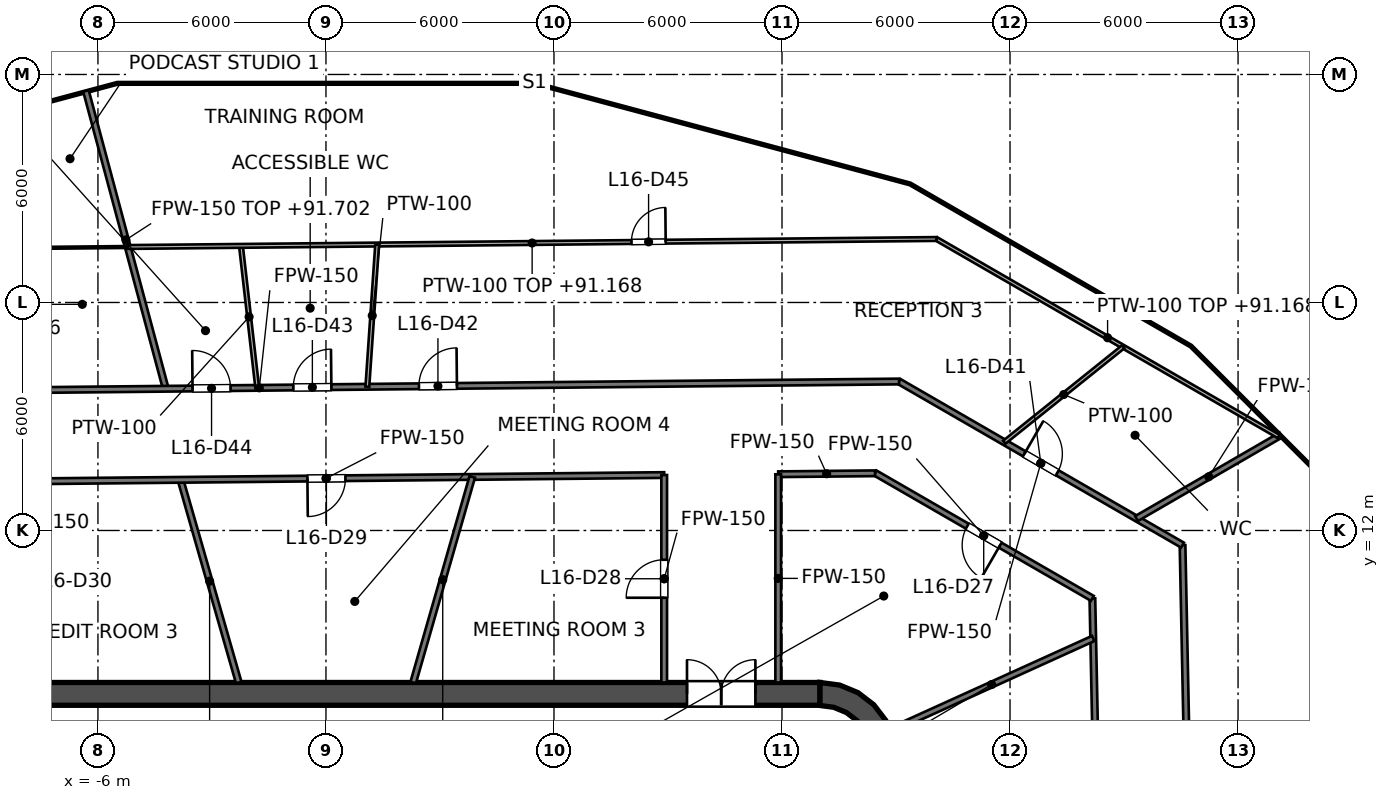
"""IFC4 building model, lengths in metres.
Left out: names, types, materials, properties, quantities, classifications, styles, units other than length and angle.
Written with IfcOpenShell. Run it as: python <this file> out.ifc"""

import sys

from ifc_helpers import new_model, si_unit, direction, frame, frame_2d, origin, place, context, subcontext, project, spatial, polyline, rectangle, outline, extrude, element, fill, save


model = new_model("IFC4")
c1 = context("Model", 3, precision=1e-05, world=origin(), true_north=direction((0.0, 1.0)))
c2 = subcontext(c1, "Body", "Model", "MODEL_VIEW")
j1 = project(units=[si_unit("LENGTHUNIT", "METRE"), si_unit("PLANEANGLEUNIT", "RADIAN")], contexts=[c1])
p1 = place(None, origin())
s1 = spatial("IfcSite", under=j1, at=p1, CompositionType="ELEMENT")
p2 = place(p1, origin())
s2 = spatial("IfcBuilding", under=s1, at=p2, CompositionType="ELEMENT")
p3 = place(p2, frame((0.0, 0.0, 88.2)))
s3 = spatial("IfcBuildingStorey", under=s2, at=p3, CompositionType="ELEMENT", Elevation=88.2)
p4 = place(p3, frame((-13.0, 7.7, 0.0), z_axis=(0.0, 0.0, 1.0), x_axis=(1.0, 0.0, 0.0)))
e1 = element("IfcWall", 1, at=p4, inside=s3, PredefinedType="SHEAR", context=c2, shape_type="SweptSolid", body=[
    extrude(rectangle(XDim=26.0, YDim=0.6, at=frame_2d((13.0, 0.0))), origin(), (0.0, 0.0, 1.0), 4.2),
])
p5 = place(p4, frame((1.7, 0.0, 0.0)))
e2 = element("IfcOpeningElement", 2, at=p5, cuts=e1, PredefinedType="OPENING", context=c2, shape_type="SweptSolid", body=[
    extrude(rectangle(XDim=1.8, YDim=2.1, at=frame_2d((0.9, 1.05))), frame((0.0, 0.3, 0.0), z_axis=(0.0, -1.0, 0.0), x_axis=(1.0, 0.0, 0.0)), (0.0, 0.0, 1.0), 0.6),
])
p6 = place(p4, frame((22.5, 0.0, 0.0)))
e3 = element("IfcOpeningElement", 3, at=p6, cuts=e1, PredefinedType="OPENING", context=c2, shape_type="SweptSolid", body=[
    extrude(rectangle(XDim=1.8, YDim=2.1, at=frame_2d((0.9, 1.05))), frame((0.0, 0.3, 0.0), z_axis=(0.0, -1.0, 0.0), x_axis=(1.0, 0.0, 0.0)), (0.0, 0.0, 1.0), 0.6),
])
p7 = place(p3, origin())
e4 = element("IfcWall", 4, at=p7, inside=s3, PredefinedType="SHEAR", context=c2, shape_type="SweptSolid", body=[
    extrude(outline(polyline([(13.0, 8.0), (13.0, 7.395), (13.361, 7.347), (13.698, 7.208), (13.986, 6.986), (14.208, 6.698), (14.347, 6.361), (14.395, 6.0), (15.0, 6.0), (14.932, 6.518), (14.732, 7.0), (14.414, 7.414), (14.0, 7.732), (13.518, 7.932), (13.0, 8.0)])), origin(), (0.0, 0.0, 1.0), 4.2),
])
p8 = place(p3, frame((-9.125, 7.0, 0.0), z_axis=(0.0, 0.0, 1.0), x_axis=(1.0, 0.0, 0.0)))
e5 = element("IfcWall", 5, at=p8, inside=s3, PredefinedType="SOLIDWALL", context=c2, shape_type="SweptSolid", body=[
    extrude(rectangle(XDim=18.25, YDim=0.8, at=frame_2d((9.125, 0.0))), origin(), (0.0, 0.0, 1.0), 4.05),
])
p9 = place(p3, frame((11.8, -7.4, 0.0), z_axis=(0.0, 0.0, 1.0), x_axis=(0.0, 1.0, 0.0)))
e6 = element("IfcWall", 6, at=p9, inside=s3, PredefinedType="SOLIDWALL", context=c2, shape_type="SweptSolid", body=[
    extrude(rectangle(XDim=14.8, YDim=0.4, at=frame_2d((7.4, 0.0))), origin(), (0.0, 0.0, 1.0), 4.05),
])
p10 = place(p9, frame((11.2, 0.0, 0.0)))
e7 = element("IfcOpeningElement", 7, at=p10, cuts=e6, PredefinedType="OPENING", context=c2, shape_type="SweptSolid", body=[
    extrude(rectangle(XDim=1.1, YDim=2.1, at=frame_2d((0.55, 1.05))), frame((0.0, 0.2, 0.0), z_axis=(0.0, -1.0, 0.0), x_axis=(1.0, 0.0, 0.0)), (0.0, 0.0, 1.0), 0.4),
])
p11 = place(p9, frame((8.3, 0.0, 0.0)))
e8 = element("IfcOpeningElement", 8, at=p11, cuts=e6, PredefinedType="OPENING", context=c2, shape_type="SweptSolid", body=[
    extrude(rectangle(XDim=1.1, YDim=2.1, at=frame_2d((0.55, 1.05))), frame((0.0, 0.2, 0.0), z_axis=(0.0, -1.0, 0.0), x_axis=(1.0, 0.0, 0.0)), (0.0, 0.0, 1.0), 0.4),
])
p12 = place(p9, frame((5.4, 0.0, 0.0)))
e9 = element("IfcOpeningElement", 9, at=p12, cuts=e6, PredefinedType="OPENING", context=c2, shape_type="SweptSolid", body=[
    extrude(rectangle(XDim=1.1, YDim=2.1, at=frame_2d((0.55, 1.05))), frame((0.0, 0.2, 0.0), z_axis=(0.0, -1.0, 0.0), x_axis=(1.0, 0.0, 0.0)), (0.0, 0.0, 1.0), 0.4),
])
p13 = place(p9, frame((13.552, 0.0, 0.0)))
e10 = element("IfcOpeningElement", 10, at=p13, cuts=e6, PredefinedType="OPENING", context=c2, shape_type="SweptSolid", body=[
    extrude(rectangle(XDim=0.9, YDim=2.1, at=frame_2d((0.45, 1.05))), frame((0.0, 0.2, 0.0), z_axis=(0.0, -1.0, 0.0), x_axis=(1.0, 0.0, 0.0)), (0.0, 0.0, 1.0), 0.4),
])
p14 = place(p9, frame((0.347, 0.0, 0.0)))
e11 = element("IfcOpeningElement", 11, at=p14, cuts=e6, PredefinedType="OPENING", context=c2, shape_type="SweptSolid", body=[
    extrude(rectangle(XDim=0.9, YDim=2.1, at=frame_2d((0.45, 1.05))), frame((0.0, 0.2, 0.0), z_axis=(0.0, -1.0, 0.0), x_axis=(1.0, 0.0, 0.0)), (0.0, 0.0, 1.0), 0.4),
])
p15 = place(p3, frame((20.167, 10.213, 0.0), z_axis=(0.0, 0.0, 1.0), x_axis=(0.020610894613, -0.999787572949, 0.0)))
e12 = element("IfcWall", 12, at=p15, inside=s3, PredefinedType="PARTITIONING", context=c2, shape_type="SweptSolid", body=[
    extrude(rectangle(XDim=17.637, YDim=0.15, at=frame_2d((8.819, 0.0))), origin(), (0.0, 0.0, 1.0), 2.968),
])
p16 = place(p15, frame((10.508, 0.0, 0.0)))
e13 = element("IfcOpeningElement", 13, at=p16, cuts=e12, PredefinedType="OPENING", context=c2, shape_type="SweptSolid", body=[
    extrude(rectangle(XDim=1.0, YDim=2.1, at=frame_2d((0.5, 1.05))), frame((0.0, 0.075, 0.0), z_axis=(0.0, -1.0, 0.0), x_axis=(1.0, 0.0, 0.0)), (0.0, 0.0, 1.0), 0.15),
])
p17 = place(p15, frame((5.09, 0.0, 0.0)))
e14 = element("IfcOpeningElement", 14, at=p17, cuts=e12, PredefinedType="OPENING", context=c2, shape_type="SweptSolid", body=[
    extrude(rectangle(XDim=1.0, YDim=2.1, at=frame_2d((0.5, 1.05))), frame((0.0, 0.075, 0.0), z_axis=(0.0, -1.0, 0.0), x_axis=(1.0, 0.0, 0.0)), (0.0, 0.0, 1.0), 0.15),
])
p18 = place(p3, frame((22.539, 11.615, 0.0), z_axis=(0.0, 0.0, 1.0), x_axis=(0.020601506683, -0.99978776644, 0.0)))
e15 = element("IfcWall", 15, at=p18, inside=s3, PredefinedType="PARTITIONING", context=c2, shape_type="SweptSolid", body=[
    extrude(rectangle(XDim=19.66, YDim=0.15, at=frame_2d((9.83, 0.0))), origin(), (0.0, 0.0, 1.0), 2.968),
])
p19 = place(p18, frame((13.54, 0.0, 0.0)))
e16 = element("IfcOpeningElement", 16, at=p19, cuts=e15, PredefinedType="OPENING", context=c2, shape_type="SweptSolid", body=[
    extrude(rectangle(XDim=1.0, YDim=2.1, at=frame_2d((0.5, 1.05))), frame((0.0, 0.075, 0.0), z_axis=(0.0, -1.0, 0.0), x_axis=(1.0, 0.0, 0.0)), (0.0, 0.0, 1.0), 0.15),
])
p20 = place(p18, frame((9.23, 0.0, 0.0)))
e17 = element("IfcOpeningElement", 17, at=p20, cuts=e15, PredefinedType="OPENING", context=c2, shape_type="SweptSolid", body=[
    extrude(rectangle(XDim=1.0, YDim=2.1, at=frame_2d((0.5, 1.05))), frame((0.0, 0.075, 0.0), z_axis=(0.0, -1.0, 0.0), x_axis=(1.0, 0.0, 0.0)), (0.0, 0.0, 1.0), 0.15),
])
p21 = place(p3, frame((-6.315, 23.566, 0.0), z_axis=(0.0, 0.0, 1.0), x_axis=(0.258844392232, -0.96591903419, 0.0)))
e18 = element("IfcWall", 18, at=p21, inside=s3, PredefinedType="PARTITIONING", context=c2, shape_type="SweptSolid", body=[
    extrude(rectangle(XDim=8.112, YDim=0.15, at=frame_2d((4.056, 0.0))), origin(), (0.0, 0.0, 1.0), 3.502),
])
p22 = place(p3, frame((-3.827, 13.333, 0.0), z_axis=(0.0, 0.0, 1.0), x_axis=(0.275935525478, -0.961176147113, 0.0)))
e19 = element("IfcWall", 19, at=p22, inside=s3, PredefinedType="PARTITIONING", context=c2, shape_type="SweptSolid", body=[
    extrude(rectangle(XDim=5.548, YDim=0.15, at=frame_2d((2.774, 0.0))), origin(), (0.0, 0.0, 1.0), 3.9),
])
p23 = place(p3, frame((14.448, 13.515, 0.0), z_axis=(0.0, 0.0, 1.0), x_axis=(0.866032288321, -0.499988075443, 0.0)))
e20 = element("IfcWall", 20, at=p23, inside=s3, PredefinedType="PARTITIONING", context=c2, shape_type="SweptSolid", body=[
    extrude(rectangle(XDim=6.604, YDim=0.15, at=frame_2d((3.302, 0.0))), origin(), (0.0, 0.0, 1.0), 2.968),
])
p24 = place(p23, frame((2.802, 0.0, 0.0)))
e21 = element("IfcOpeningElement", 21, at=p24, cuts=e20, PredefinedType="OPENING", context=c2, shape_type="SweptSolid", body=[
    extrude(rectangle(XDim=1.0, YDim=2.1, at=frame_2d((0.5, 1.05))), frame((0.0, 0.075, 0.0), z_axis=(0.0, -1.0, 0.0), x_axis=(1.0, 0.0, 0.0)), (0.0, 0.0, 1.0), 0.15),
])
p25 = place(p3, frame((15.08, 15.921, 0.0), z_axis=(0.0, 0.0, 1.0), x_axis=(0.866020838546, -0.500007907142, 0.0)))
e22 = element("IfcWall", 22, at=p25, inside=s3, PredefinedType="PARTITIONING", context=c2, shape_type="SweptSolid", body=[
    extrude(rectangle(XDim=8.613, YDim=0.15, at=frame_2d((4.306, 0.0))), origin(), (0.0, 0.0, 1.0), 2.968),
])
p26 = place(p25, frame((3.807, 0.0, 0.0)))
e23 = element("IfcOpeningElement", 23, at=p26, cuts=e22, PredefinedType="OPENING", context=c2, shape_type="SweptSolid", body=[
    extrude(rectangle(XDim=1.0, YDim=2.1, at=frame_2d((0.5, 1.05))), frame((0.0, 0.075, 0.0), z_axis=(0.0, -1.0, 0.0), x_axis=(1.0, 0.0, 0.0)), (0.0, 0.0, 1.0), 0.15),
])
p27 = place(p3, frame((-8.9, 13.282, 0.0), z_axis=(0.0, 0.0, 1.0), x_axis=(0.999950834077, 0.009916119672, 0.0)))
e24 = element("IfcWall", 24, at=p27, inside=s3, PredefinedType="PARTITIONING", context=c2, shape_type="SweptSolid", body=[
    extrude(rectangle(XDim=17.801, YDim=0.15, at=frame_2d((8.9, 0.0))), origin(), (0.0, 0.0, 1.0), 2.968),
])
p28 = place(p27, frame((8.412, 0.0, 0.0)))
e25 = element("IfcOpeningElement", 25, at=p28, cuts=e24, PredefinedType="OPENING", context=c2, shape_type="SweptSolid", body=[
    extrude(rectangle(XDim=1.0, YDim=2.1, at=frame_2d((0.5, 1.05))), frame((0.0, 0.075, 0.0), z_axis=(0.0, -1.0, 0.0), x_axis=(1.0, 0.0, 0.0)), (0.0, 0.0, 1.0), 0.15),
])
p29 = place(p3, frame((11.9, 13.48, 0.0), z_axis=(0.0, 0.0, 1.0), x_axis=(0.999950357576, 0.009964054536, 0.0)))
e26 = element("IfcWall", 26, at=p29, inside=s3, PredefinedType="PARTITIONING", context=c2, shape_type="SweptSolid", body=[
    extrude(rectangle(XDim=2.548, YDim=0.15, at=frame_2d((1.274, 0.0))), origin(), (0.0, 0.0, 1.0), 2.968),
])
p30 = place(p3, frame((-18.587, 15.587, 0.0), z_axis=(0.0, 0.0, 1.0), x_axis=(0.99995087003, 0.009912493396, 0.0)))
e27 = element("IfcWall", 27, at=p30, inside=s3, PredefinedType="PARTITIONING", context=c2, shape_type="SweptSolid", body=[
    extrude(rectangle(XDim=33.669, YDim=0.15, at=frame_2d((16.834, 0.0))), origin(), (0.0, 0.0, 1.0), 2.968),
])
p31 = place(p30, frame((21.034, 0.0, 0.0)))
e28 = element("IfcOpeningElement", 28, at=p31, cuts=e27, PredefinedType="OPENING", context=c2, shape_type="SweptSolid", body=[
    extrude(rectangle(XDim=1.0, YDim=2.1, at=frame_2d((0.5, 1.05))), frame((0.0, 0.075, 0.0), z_axis=(0.0, -1.0, 0.0), x_axis=(1.0, 0.0, 0.0)), (0.0, 0.0, 1.0), 0.15),
])
p32 = place(p30, frame((17.73, 0.0, 0.0)))
e29 = element("IfcOpeningElement", 29, at=p32, cuts=e27, PredefinedType="OPENING", context=c2, shape_type="SweptSolid", body=[
    extrude(rectangle(XDim=1.0, YDim=2.1, at=frame_2d((0.5, 1.05))), frame((0.0, 0.075, 0.0), z_axis=(0.0, -1.0, 0.0), x_axis=(1.0, 0.0, 0.0)), (0.0, 0.0, 1.0), 0.15),
])
p33 = place(p30, frame((15.077, 0.0, 0.0)))
e30 = element("IfcOpeningElement", 30, at=p33, cuts=e27, PredefinedType="OPENING", context=c2, shape_type="SweptSolid", body=[
    extrude(rectangle(XDim=1.0, YDim=2.1, at=frame_2d((0.5, 1.05))), frame((0.0, 0.075, 0.0), z_axis=(0.0, -1.0, 0.0), x_axis=(1.0, 0.0, 0.0)), (0.0, 0.0, 1.0), 0.15),
])
p34 = place(p30, frame((10.026, 0.0, 0.0)))
e31 = element("IfcOpeningElement", 31, at=p34, cuts=e27, PredefinedType="OPENING", context=c2, shape_type="SweptSolid", body=[
    extrude(rectangle(XDim=1.0, YDim=2.1, at=frame_2d((0.5, 1.05))), frame((0.0, 0.075, 0.0), z_axis=(0.0, -1.0, 0.0), x_axis=(1.0, 0.0, 0.0)), (0.0, 0.0, 1.0), 0.15),
])
p35 = place(p30, frame((2.737, 0.0, 0.0)))
e32 = element("IfcOpeningElement", 32, at=p35, cuts=e27, PredefinedType="OPENING", context=c2, shape_type="SweptSolid", body=[
    extrude(rectangle(XDim=1.0, YDim=2.1, at=frame_2d((0.5, 1.05))), frame((0.0, 0.075, 0.0), z_axis=(0.0, -1.0, 0.0), x_axis=(1.0, 0.0, 0.0)), (0.0, 0.0, 1.0), 0.15),
])
p36 = place(p3, frame((14.843, 6.733, 0.0), z_axis=(0.0, 0.0, 1.0), x_axis=(0.910628361306, 0.413226315214, 0.0)))
e33 = element("IfcWall", 33, at=p36, inside=s3, PredefinedType="PARTITIONING", context=c2, shape_type="SweptSolid", body=[
    extrude(rectangle(XDim=5.87, YDim=0.15, at=frame_2d((2.935, 0.0))), origin(), (0.0, 0.0, 1.0), 3.9),
])
p37 = place(p3, frame((21.329, 12.314, 0.0), z_axis=(0.0, 0.0, 1.0), x_axis=(0.865416132284, 0.501053807472, 0.0)))
e34 = element("IfcWall", 34, at=p37, inside=s3, PredefinedType="PARTITIONING", context=c2, shape_type="SweptSolid", body=[
    extrude(rectangle(XDim=4.39, YDim=0.15, at=frame_2d((2.195, 0.0))), origin(), (0.0, 0.0, 1.0), 3.045),
])
p38 = place(p3, frame((2.296, 8.0, 0.0), z_axis=(0.0, 0.0, 1.0), x_axis=(0.275958345059, 0.961169595749, 0.0)))
e35 = element("IfcWall", 35, at=p38, inside=s3, PredefinedType="PARTITIONING", context=c2, shape_type="SweptSolid", body=[
    extrude(rectangle(XDim=5.628, YDim=0.15, at=frame_2d((2.814, 0.0))), origin(), (0.0, 0.0, 1.0), 3.9),
])
p39 = place(p3, frame((11.9, 8.0, 0.0), z_axis=(0.0, 0.0, 1.0), x_axis=(0.0, 1.0, 0.0)))
e36 = element("IfcWall", 36, at=p39, inside=s3, PredefinedType="PARTITIONING", context=c2, shape_type="SweptSolid", body=[
    extrude(rectangle(XDim=5.479, YDim=0.15, at=frame_2d((2.74, 0.0))), origin(), (0.0, 0.0, 1.0), 2.968),
])
p40 = place(p3, frame((8.9, 8.0, 0.0), z_axis=(0.0, 0.0, 1.0), x_axis=(0.0, 1.0, 0.0)))
e37 = element("IfcWall", 37, at=p40, inside=s3, PredefinedType="PARTITIONING", context=c2, shape_type="SweptSolid", body=[
    extrude(rectangle(XDim=5.46, YDim=0.15, at=frame_2d((2.73, 0.0))), origin(), (0.0, 0.0, 1.0), 2.968),
])
p41 = place(p40, frame((2.23, 0.0, 0.0)))
e38 = element("IfcOpeningElement", 38, at=p41, cuts=e37, PredefinedType="OPENING", context=c2, shape_type="SweptSolid", body=[
    extrude(rectangle(XDim=1.0, YDim=2.1, at=frame_2d((0.5, 1.05))), frame((0.0, 0.075, 0.0), z_axis=(0.0, -1.0, 0.0), x_axis=(1.0, 0.0, 0.0)), (0.0, 0.0, 1.0), 0.15),
])
p42 = place(p3, frame((-18.512, 19.328, 0.0), z_axis=(0.0, 0.0, 1.0), x_axis=(0.999950851933, 0.009914318817, 0.0)))
e39 = element("IfcWall", 39, at=p42, inside=s3, PredefinedType="PARTITIONING", context=c2, shape_type="SweptSolid", body=[
    extrude(rectangle(XDim=13.298, YDim=0.05, at=frame_2d((6.649, 0.0))), origin(), (0.0, 0.0, 1.0), 2.968),
])
p43 = place(p42, frame((7.975, 0.0, 0.0)))
e40 = element("IfcOpeningElement", 40, at=p43, cuts=e39, PredefinedType="OPENING", context=c2, shape_type="SweptSolid", body=[
    extrude(rectangle(XDim=1.0, YDim=2.1, at=frame_2d((0.5, 1.05))), frame((0.0, 0.025, 0.0), z_axis=(0.0, -1.0, 0.0), x_axis=(1.0, 0.0, 0.0)), (0.0, 0.0, 1.0), 0.05),
])
p44 = place(p42, frame((2.003, 0.0, 0.0)))
e41 = element("IfcOpeningElement", 41, at=p44, cuts=e39, PredefinedType="OPENING", context=c2, shape_type="SweptSolid", body=[
    extrude(rectangle(XDim=1.0, YDim=2.1, at=frame_2d((0.5, 1.05))), frame((0.0, 0.025, 0.0), z_axis=(0.0, -1.0, 0.0), x_axis=(1.0, 0.0, 0.0)), (0.0, 0.0, 1.0), 0.05),
])
p45 = place(p3, frame((-2.237, 19.49, 0.0), z_axis=(0.0, 0.0, 1.0), x_axis=(0.114064733863, -0.993473319465, 0.0)))
e42 = element("IfcWall", 42, at=p45, inside=s3, PredefinedType="PARTITIONING", context=c2, shape_type="SweptSolid", body=[
    extrude(rectangle(XDim=3.761, YDim=0.1, at=frame_2d((1.88, 0.0))), origin(), (0.0, 0.0, 1.0), 3.9),
])
p46 = place(p3, frame((16.065, 19.671, 0.0), z_axis=(0.0, 0.0, 1.0), x_axis=(0.866058502288, -0.499942667328, 0.0)))
e43 = element("IfcWall", 43, at=p46, inside=s3, PredefinedType="PARTITIONING", context=c2, shape_type="SweptSolid", body=[
    extrude(rectangle(XDim=10.397, YDim=0.1, at=frame_2d((5.198, 0.0))), origin(), (0.0, 0.0, 1.0), 2.968),
])
p47 = place(p3, frame((-5.215, 19.46, 0.0), z_axis=(0.0, 0.0, 1.0), x_axis=(0.999950988801, 0.00990050484, 0.0)))
e44 = element("IfcWall", 44, at=p47, inside=s3, PredefinedType="PARTITIONING", context=c2, shape_type="SweptSolid", body=[
    extrude(rectangle(XDim=21.281, YDim=0.1, at=frame_2d((10.641, 0.0))), origin(), (0.0, 0.0, 1.0), 2.968),
])
p48 = place(p47, frame((13.255, 0.0, 0.0)))
e45 = element("IfcOpeningElement", 45, at=p48, cuts=e44, PredefinedType="OPENING", context=c2, shape_type="SweptSolid", body=[
    extrude(rectangle(XDim=0.9, YDim=2.1, at=frame_2d((0.45, 1.05))), frame((0.0, 0.05, 0.0), z_axis=(0.0, -1.0, 0.0), x_axis=(1.0, 0.0, 0.0)), (0.0, 0.0, 1.0), 0.1),
])
p49 = place(p3, frame((17.849, 14.323, 0.0), z_axis=(0.0, 0.0, 1.0), x_axis=(0.7800073623, 0.625770337071, 0.0)))
e46 = element("IfcWall", 46, at=p49, inside=s3, PredefinedType="PARTITIONING", context=c2, shape_type="SweptSolid", body=[
    extrude(rectangle(XDim=4.013, YDim=0.1, at=frame_2d((2.006, 0.0))), origin(), (0.0, 0.0, 1.0), 3.9),
])
p50 = place(p3, frame((1.089, 15.783, 0.0), z_axis=(0.0, 0.0, 1.0), x_axis=(0.068735075686, 0.99763494795, 0.0)))
e47 = element("IfcWall", 47, at=p50, inside=s3, PredefinedType="PARTITIONING", context=c2, shape_type="SweptSolid", body=[
    extrude(rectangle(XDim=3.751, YDim=0.1, at=frame_2d((1.875, 0.0))), origin(), (0.0, 0.0, 1.0), 3.9),
])
p51 = place(p13, origin())
e48 = element("IfcDoor", 48, at=p51, inside=s3, OperationType="SINGLE_SWING_RIGHT", PredefinedType="DOOR", context=c2, shape_type="SweptSolid", body=[
    extrude(rectangle(XDim=0.9, YDim=2.1, at=frame_2d((0.45, 1.05))), frame((0.0, 0.025, 0.0), z_axis=(0.0, -1.0, 0.0), x_axis=(1.0, 0.0, 0.0)), (0.0, 0.0, 1.0), 0.05),
])
fill(e10, e48)
p52 = place(p6, origin())
e49 = element("IfcDoor", 49, at=p52, inside=s3, OperationType="DOUBLE_DOOR_SINGLE_SWING", PredefinedType="DOOR", context=c2, shape_type="SweptSolid", body=[
    extrude(rectangle(XDim=1.8, YDim=2.1, at=frame_2d((0.9, 1.05))), frame((0.0, 0.025, 0.0), z_axis=(0.0, -1.0, 0.0), x_axis=(1.0, 0.0, 0.0)), (0.0, 0.0, 1.0), 0.05),
])
fill(e3, e49)
p53 = place(p24, origin())
e50 = element("IfcDoor", 50, at=p53, inside=s3, OperationType="SINGLE_SWING_RIGHT", PredefinedType="DOOR", context=c2, shape_type="SweptSolid", body=[
    extrude(rectangle(XDim=1.0, YDim=2.1, at=frame_2d((0.5, 1.05))), frame((0.0, 0.025, 0.0), z_axis=(0.0, -1.0, 0.0), x_axis=(1.0, 0.0, 0.0)), (0.0, 0.0, 1.0), 0.05),
])
fill(e21, e50)
p54 = place(p41, origin())
e51 = element("IfcDoor", 51, at=p54, inside=s3, OperationType="SINGLE_SWING_LEFT", PredefinedType="DOOR", context=c2, shape_type="SweptSolid", body=[
    extrude(rectangle(XDim=1.0, YDim=2.1, at=frame_2d((0.5, 1.05))), frame((0.0, 0.025, 0.0), z_axis=(0.0, -1.0, 0.0), x_axis=(1.0, 0.0, 0.0)), (0.0, 0.0, 1.0), 0.05),
])
fill(e38, e51)
p55 = place(p28, origin())
e52 = element("IfcDoor", 52, at=p55, inside=s3, OperationType="SINGLE_SWING_LEFT", PredefinedType="DOOR", context=c2, shape_type="SweptSolid", body=[
    extrude(rectangle(XDim=1.0, YDim=2.1, at=frame_2d((0.5, 1.05))), frame((0.0, 0.025, 0.0), z_axis=(0.0, -1.0, 0.0), x_axis=(1.0, 0.0, 0.0)), (0.0, 0.0, 1.0), 0.05),
])
fill(e25, e52)
p56 = place(p26, origin())
e53 = element("IfcDoor", 53, at=p56, inside=s3, OperationType="SINGLE_SWING_LEFT", PredefinedType="DOOR", context=c2, shape_type="SweptSolid", body=[
    extrude(rectangle(XDim=1.0, YDim=2.1, at=frame_2d((0.5, 1.05))), frame((0.0, 0.025, 0.0), z_axis=(0.0, -1.0, 0.0), x_axis=(1.0, 0.0, 0.0)), (0.0, 0.0, 1.0), 0.05),
])
fill(e23, e53)
p57 = place(p31, origin())
e54 = element("IfcDoor", 54, at=p57, inside=s3, OperationType="SINGLE_SWING_RIGHT", PredefinedType="DOOR", context=c2, shape_type="SweptSolid", body=[
    extrude(rectangle(XDim=1.0, YDim=2.1, at=frame_2d((0.5, 1.05))), frame((0.0, 0.025, 0.0), z_axis=(0.0, -1.0, 0.0), x_axis=(1.0, 0.0, 0.0)), (0.0, 0.0, 1.0), 0.05),
])
fill(e28, e54)
p58 = place(p32, origin())
e55 = element("IfcDoor", 55, at=p58, inside=s3, OperationType="SINGLE_SWING_RIGHT", PredefinedType="DOOR", context=c2, shape_type="SweptSolid", body=[
    extrude(rectangle(XDim=1.0, YDim=2.1, at=frame_2d((0.5, 1.05))), frame((0.0, 0.025, 0.0), z_axis=(0.0, -1.0, 0.0), x_axis=(1.0, 0.0, 0.0)), (0.0, 0.0, 1.0), 0.05),
])
fill(e29, e55)
p59 = place(p33, origin())
e56 = element("IfcDoor", 56, at=p59, inside=s3, OperationType="SINGLE_SWING_LEFT", PredefinedType="DOOR", context=c2, shape_type="SweptSolid", body=[
    extrude(rectangle(XDim=1.0, YDim=2.1, at=frame_2d((0.5, 1.05))), frame((0.0, 0.025, 0.0), z_axis=(0.0, -1.0, 0.0), x_axis=(1.0, 0.0, 0.0)), (0.0, 0.0, 1.0), 0.05),
])
fill(e30, e56)
p60 = place(p48, origin())
e57 = element("IfcDoor", 57, at=p60, inside=s3, OperationType="SINGLE_SWING_RIGHT", PredefinedType="DOOR", context=c2, shape_type="SweptSolid", body=[
    extrude(rectangle(XDim=0.9, YDim=2.1, at=frame_2d((0.45, 1.05))), frame((0.0, 0.025, 0.0), z_axis=(0.0, -1.0, 0.0), x_axis=(1.0, 0.0, 0.0)), (0.0, 0.0, 1.0), 0.05),
])
fill(e45, e57)
save(model, sys.argv[1])
